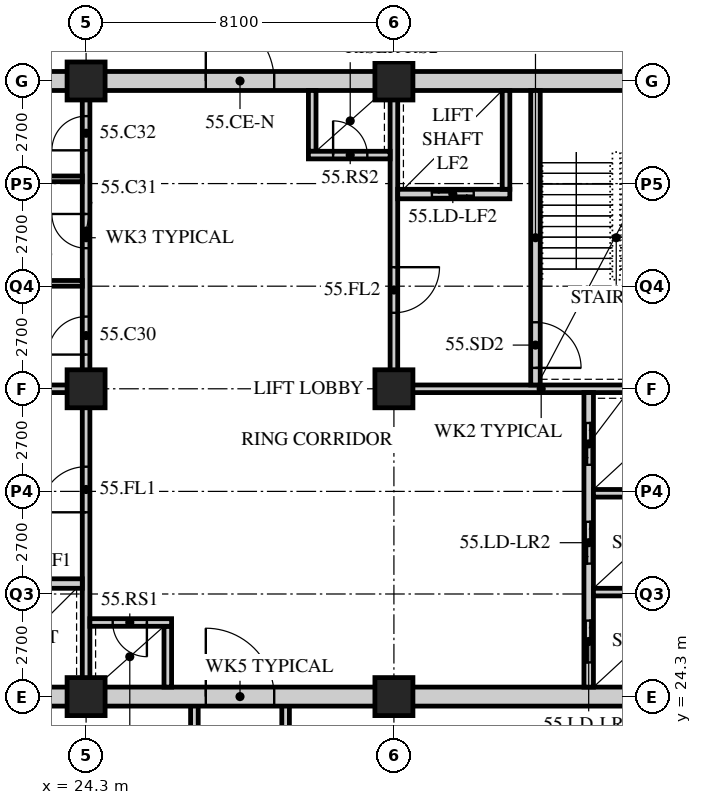
"""IFC4 building model, lengths in metres.
Left out: names, types, materials, properties, quantities, classifications, styles, units other than length and angle.
Written with IfcOpenShell. Run it as: python <this file> out.ifc"""

import sys

from ifc_helpers import new_model, si_unit, direction, frame, frame_2d, origin, origin_2d, place, context, subcontext, project, spatial, rectangle, hollow_rectangle, extrude, element, fill, save


model = new_model("IFC4")
c1 = context("Model", 3, precision=1e-05, world=origin(), true_north=direction((0.0, 1.0)))
c2 = subcontext(c1, "Body", "Model", "MODEL_VIEW")
j1 = project(units=[si_unit("LENGTHUNIT", "METRE"), si_unit("PLANEANGLEUNIT", "RADIAN")], contexts=[c1])
p1 = place(None, origin())
s1 = spatial("IfcSite", under=j1, at=p1, CompositionType="ELEMENT")
p2 = place(p1, origin())
s2 = spatial("IfcBuilding", under=s1, at=p2, CompositionType="ELEMENT")
p3 = place(p2, frame((0.0, 0.0, 213.6)))
s3 = spatial("IfcBuildingStorey", under=s2, at=p3, CompositionType="ELEMENT", Elevation=213.6)
for number, where, z_axis, x_axis in (
    (1, (24.3, 24.3, 0.0), (0.0, 0.0, 1.0), (1.0, 0.0, 0.0)),
    (2, (24.3, 32.4, 0.0), (0.0, 0.0, 1.0), (1.0, 0.0, 0.0)),
    (3, (24.3, 40.5, 0.0), (0.0, 0.0, 1.0), (1.0, 0.0, 0.0)),
    (4, (32.4, 24.3, 0.0), (0.0, 0.0, 1.0), (1.0, 0.0, 0.0)),
    (5, (32.4, 32.4, 0.0), (0.0, 0.0, 1.0), (1.0, 0.0, 0.0)),
    (6, (32.4, 40.5, 0.0), (0.0, 0.0, 1.0), (1.0, 0.0, 0.0)),
):
    element("IfcColumn", number, at=place(p3, frame(where, z_axis=z_axis, x_axis=x_axis)), inside=s3, PredefinedType="COLUMN", context=c2, shape_type="SweptSolid", body=[
        extrude(hollow_rectangle(XDim=1.0, YDim=1.0, WallThickness=0.1, at=origin_2d()), origin(), (0.0, 0.0, 1.0), 3.6),
    ])
for number, where, z_axis, x_axis in (
    (7, (27.15, 20.7, 0.0), (0.0, 0.0, 1.0), (0.0, 1.0, 0.0)),
    (8, (29.55, 20.7, 0.0), (0.0, 0.0, 1.0), (0.0, 1.0, 0.0)),
):
    element("IfcWall", number, at=place(p3, frame(where, z_axis=z_axis, x_axis=x_axis)), inside=s3, PredefinedType="SOLIDWALL", context=c2, shape_type="SweptSolid", body=[
        extrude(rectangle(XDim=3.6, YDim=0.2, at=frame_2d((1.8, 0.0))), origin(), (0.0, 0.0, 1.0), 3.39),
    ])
p4 = place(p3, frame((15.95, 24.3, 0.0), z_axis=(0.0, 0.0, 1.0), x_axis=(1.0, 0.0, 0.0)))
e9 = element("IfcWall", 9, at=p4, inside=s3, PredefinedType="SOLIDWALL", context=c2, shape_type="SweptSolid", body=[
    extrude(rectangle(XDim=24.8, YDim=0.5, at=frame_2d((12.4, 0.0))), origin(), (0.0, 0.0, 1.0), 2.74),
])
p5 = place(p4, frame((11.5, 0.0, 0.0)))
e10 = element("IfcOpeningElement", 10, at=p5, cuts=e9, PredefinedType="OPENING", context=c2, shape_type="SweptSolid", body=[
    extrude(rectangle(XDim=1.8, YDim=2.4, at=frame_2d((0.9, 1.2))), frame((0.0, 0.26, 0.0), z_axis=(0.0, -1.0, 0.0), x_axis=(1.0, 0.0, 0.0)), (0.0, 0.0, 1.0), 0.52),
])
p6 = place(p3, frame((15.95, 40.5, 0.0), z_axis=(0.0, 0.0, 1.0), x_axis=(1.0, 0.0, 0.0)))
e11 = element("IfcWall", 11, at=p6, inside=s3, PredefinedType="SOLIDWALL", context=c2, shape_type="SweptSolid", body=[
    extrude(rectangle(XDim=24.8, YDim=0.5, at=frame_2d((12.4, 0.0))), origin(), (0.0, 0.0, 1.0), 2.74),
])
p7 = place(p6, frame((11.5, 0.0, 0.0)))
e12 = element("IfcOpeningElement", 12, at=p7, cuts=e11, PredefinedType="OPENING", context=c2, shape_type="SweptSolid", body=[
    extrude(rectangle(XDim=1.8, YDim=2.4, at=frame_2d((0.9, 1.2))), frame((0.0, 0.26, 0.0), z_axis=(0.0, -1.0, 0.0), x_axis=(1.0, 0.0, 0.0)), (0.0, 0.0, 1.0), 0.52),
])
p8 = place(p3, frame((16.45, 32.4, 0.0), z_axis=(0.0, 0.0, 1.0), x_axis=(1.0, 0.0, 0.0)))
e13 = element("IfcWall", 13, at=p8, inside=s3, PredefinedType="SOLIDWALL", context=c2, shape_type="SweptSolid", body=[
    extrude(rectangle(XDim=7.95, YDim=0.2, at=frame_2d((3.975, 0.0))), origin(), (0.0, 0.0, 1.0), 2.778),
])
p9 = place(p3, frame((24.3, 24.55, 0.0), z_axis=(0.0, 0.0, 1.0), x_axis=(0.0, 1.0, 0.0)))
e14 = element("IfcWall", 14, at=p9, inside=s3, PredefinedType="SOLIDWALL", context=c2, shape_type="SweptSolid", body=[
    extrude(rectangle(XDim=7.75, YDim=0.2, at=frame_2d((3.875, 0.0))), origin(), (0.0, 0.0, 1.0), 2.778),
])
p10 = place(p9, frame((4.6, 0.0, 0.0)))
e15 = element("IfcOpeningElement", 15, at=p10, cuts=e14, PredefinedType="OPENING", context=c2, shape_type="SweptSolid", body=[
    extrude(rectangle(XDim=1.2, YDim=2.1, at=frame_2d((0.6, 1.05))), frame((0.0, 0.11, 0.0), z_axis=(0.0, -1.0, 0.0), x_axis=(1.0, 0.0, 0.0)), (0.0, 0.0, 1.0), 0.22),
])
p11 = place(p3, frame((21.25, 27.275, 0.0), z_axis=(0.0, 0.0, 1.0), x_axis=(1.0, 0.0, 0.0)))
e16 = element("IfcWall", 16, at=p11, inside=s3, PredefinedType="SOLIDWALL", context=c2, shape_type="SweptSolid", body=[
    extrude(rectangle(XDim=2.95, YDim=0.25, at=frame_2d((1.475, 0.0))), origin(), (0.0, 0.0, 1.0), 3.39),
])
p12 = place(p11, frame((0.95, 0.0, 0.0)))
e17 = element("IfcOpeningElement", 17, at=p12, cuts=e16, PredefinedType="OPENING", context=c2, shape_type="SweptSolid", body=[
    extrude(rectangle(XDim=1.1, YDim=2.4, at=frame_2d((0.55, 1.2))), frame((0.0, 0.135, 0.0), z_axis=(0.0, -1.0, 0.0), x_axis=(1.0, 0.0, 0.0)), (0.0, 0.0, 1.0), 0.27),
])
p13 = place(p3, frame((26.45, 24.55, 0.0), z_axis=(0.0, 0.0, 1.0), x_axis=(0.0, 1.0, 0.0)))
e18 = element("IfcWall", 18, at=p13, inside=s3, PredefinedType="SOLIDWALL", context=c2, shape_type="SweptSolid", body=[
    extrude(rectangle(XDim=1.6, YDim=0.2, at=frame_2d((0.8, 0.0))), origin(), (0.0, 0.0, 1.0), 3.39),
])
p14 = place(p3, frame((24.4, 26.25, 0.0), z_axis=(0.0, 0.0, 1.0), x_axis=(1.0, 0.0, 0.0)))
e19 = element("IfcWall", 19, at=p14, inside=s3, PredefinedType="SOLIDWALL", context=c2, shape_type="SweptSolid", body=[
    extrude(rectangle(XDim=2.15, YDim=0.2, at=frame_2d((1.075, 0.0))), origin(), (0.0, 0.0, 1.0), 3.39),
])
p15 = place(p14, frame((0.6, 0.0, 0.0)))
e20 = element("IfcOpeningElement", 20, at=p15, cuts=e19, PredefinedType="OPENING", context=c2, shape_type="SweptSolid", body=[
    extrude(rectangle(XDim=0.9, YDim=2.1, at=frame_2d((0.45, 1.05))), frame((0.0, 0.11, 0.0), z_axis=(0.0, -1.0, 0.0), x_axis=(1.0, 0.0, 0.0)), (0.0, 0.0, 1.0), 0.22),
])
p16 = place(p3, frame((32.3, 32.4, 0.0), z_axis=(0.0, 0.0, 1.0), x_axis=(1.0, 0.0, 0.0)))
e21 = element("IfcWall", 21, at=p16, inside=s3, PredefinedType="SOLIDWALL", context=c2, shape_type="SweptSolid", body=[
    extrude(rectangle(XDim=7.95, YDim=0.2, at=frame_2d((3.975, 0.0))), origin(), (0.0, 0.0, 1.0), 2.778),
])
p17 = place(p3, frame((32.4, 32.5, 0.0), z_axis=(0.0, 0.0, 1.0), x_axis=(0.0, 1.0, 0.0)))
e22 = element("IfcWall", 22, at=p17, inside=s3, PredefinedType="SOLIDWALL", context=c2, shape_type="SweptSolid", body=[
    extrude(rectangle(XDim=7.75, YDim=0.2, at=frame_2d((3.875, 0.0))), origin(), (0.0, 0.0, 1.0), 2.778),
])
p18 = place(p17, frame((1.9, 0.0, 0.0)))
e23 = element("IfcOpeningElement", 23, at=p18, cuts=e22, PredefinedType="OPENING", context=c2, shape_type="SweptSolid", body=[
    extrude(rectangle(XDim=1.2, YDim=2.1, at=frame_2d((0.6, 1.05))), frame((0.0, 0.11, 0.0), z_axis=(0.0, -1.0, 0.0), x_axis=(1.0, 0.0, 0.0)), (0.0, 0.0, 1.0), 0.22),
])
p19 = place(p3, frame((37.525, 24.55, 0.0), z_axis=(0.0, 0.0, 1.0), x_axis=(0.0, 1.0, 0.0)))
e24 = element("IfcWall", 24, at=p19, inside=s3, PredefinedType="SOLIDWALL", context=c2, shape_type="SweptSolid", body=[
    extrude(rectangle(XDim=7.75, YDim=0.25, at=frame_2d((3.875, 0.0))), origin(), (0.0, 0.0, 1.0), 3.39),
])
p20 = place(p19, frame((0.65, 0.0, 0.0)))
e25 = element("IfcOpeningElement", 25, at=p20, cuts=e24, PredefinedType="OPENING", context=c2, shape_type="SweptSolid", body=[
    extrude(rectangle(XDim=1.1, YDim=2.4, at=frame_2d((0.55, 1.2))), frame((0.0, 0.135, 0.0), z_axis=(0.0, -1.0, 0.0), x_axis=(1.0, 0.0, 0.0)), (0.0, 0.0, 1.0), 0.27),
])
p21 = place(p19, frame((3.25, 0.0, 0.0)))
e26 = element("IfcOpeningElement", 26, at=p21, cuts=e24, PredefinedType="OPENING", context=c2, shape_type="SweptSolid", body=[
    extrude(rectangle(XDim=1.1, YDim=2.4, at=frame_2d((0.55, 1.2))), frame((0.0, 0.135, 0.0), z_axis=(0.0, -1.0, 0.0), x_axis=(1.0, 0.0, 0.0)), (0.0, 0.0, 1.0), 0.27),
])
p22 = place(p19, frame((5.85, 0.0, 0.0)))
e27 = element("IfcOpeningElement", 27, at=p22, cuts=e24, PredefinedType="OPENING", context=c2, shape_type="SweptSolid", body=[
    extrude(rectangle(XDim=1.1, YDim=2.4, at=frame_2d((0.55, 1.2))), frame((0.0, 0.135, 0.0), z_axis=(0.0, -1.0, 0.0), x_axis=(1.0, 0.0, 0.0)), (0.0, 0.0, 1.0), 0.27),
])
for number, where, z_axis, x_axis in (
    (28, (37.65, 27.05, 0.0), (0.0, 0.0, 1.0), (1.0, 0.0, 0.0)),
    (29, (37.65, 29.65, 0.0), (0.0, 0.0, 1.0), (1.0, 0.0, 0.0)),
):
    element("IfcWall", number, at=place(p3, frame(where, z_axis=z_axis, x_axis=x_axis)), inside=s3, PredefinedType="SOLIDWALL", context=c2, shape_type="SweptSolid", body=[
        extrude(rectangle(XDim=2.6, YDim=0.2, at=frame_2d((1.3, 0.0))), origin(), (0.0, 0.0, 1.0), 3.39),
    ])
p23 = place(p3, frame((36.125, 32.5, 0.0), z_axis=(0.0, 0.0, 1.0), x_axis=(0.0, 1.0, 0.0)))
e30 = element("IfcWall", 30, at=p23, inside=s3, PredefinedType="SOLIDWALL", context=c2, shape_type="SweptSolid", body=[
    extrude(rectangle(XDim=7.75, YDim=0.25, at=frame_2d((3.875, 0.0))), origin(), (0.0, 0.0, 1.0), 3.39),
])
p24 = place(p23, frame((0.45, 0.0, 0.0)))
e31 = element("IfcOpeningElement", 31, at=p24, cuts=e30, PredefinedType="OPENING", context=c2, shape_type="SweptSolid", body=[
    extrude(rectangle(XDim=1.2, YDim=2.1, at=frame_2d((0.6, 1.05))), frame((0.0, 0.135, 0.0), z_axis=(0.0, -1.0, 0.0), x_axis=(1.0, 0.0, 0.0)), (0.0, 0.0, 1.0), 0.27),
])
p25 = place(p3, frame((32.5, 37.525, 0.0), z_axis=(0.0, 0.0, 1.0), x_axis=(1.0, 0.0, 0.0)))
e32 = element("IfcWall", 32, at=p25, inside=s3, PredefinedType="SOLIDWALL", context=c2, shape_type="SweptSolid", body=[
    extrude(rectangle(XDim=2.95, YDim=0.25, at=frame_2d((1.475, 0.0))), origin(), (0.0, 0.0, 1.0), 3.39),
])
p26 = place(p25, frame((0.9, 0.0, 0.0)))
e33 = element("IfcOpeningElement", 33, at=p26, cuts=e32, PredefinedType="OPENING", context=c2, shape_type="SweptSolid", body=[
    extrude(rectangle(XDim=1.1, YDim=2.4, at=frame_2d((0.55, 1.2))), frame((0.0, 0.135, 0.0), z_axis=(0.0, -1.0, 0.0), x_axis=(1.0, 0.0, 0.0)), (0.0, 0.0, 1.0), 0.27),
])
p27 = place(p3, frame((35.35, 37.65, 0.0), z_axis=(0.0, 0.0, 1.0), x_axis=(0.0, 1.0, 0.0)))
e34 = element("IfcWall", 34, at=p27, inside=s3, PredefinedType="SOLIDWALL", context=c2, shape_type="SweptSolid", body=[
    extrude(rectangle(XDim=2.6, YDim=0.2, at=frame_2d((1.3, 0.0))), origin(), (0.0, 0.0, 1.0), 3.39),
])
p28 = place(p3, frame((30.25, 38.65, 0.0), z_axis=(0.0, 0.0, 1.0), x_axis=(0.0, 1.0, 0.0)))
e35 = element("IfcWall", 35, at=p28, inside=s3, PredefinedType="SOLIDWALL", context=c2, shape_type="SweptSolid", body=[
    extrude(rectangle(XDim=1.6, YDim=0.2, at=frame_2d((0.8, 0.0))), origin(), (0.0, 0.0, 1.0), 3.39),
])
p29 = place(p3, frame((30.15, 38.55, 0.0), z_axis=(0.0, 0.0, 1.0), x_axis=(1.0, 0.0, 0.0)))
e36 = element("IfcWall", 36, at=p29, inside=s3, PredefinedType="SOLIDWALL", context=c2, shape_type="SweptSolid", body=[
    extrude(rectangle(XDim=2.15, YDim=0.2, at=frame_2d((1.075, 0.0))), origin(), (0.0, 0.0, 1.0), 3.39),
])
p30 = place(p29, frame((0.65, 0.0, 0.0)))
e37 = element("IfcOpeningElement", 37, at=p30, cuts=e36, PredefinedType="OPENING", context=c2, shape_type="SweptSolid", body=[
    extrude(rectangle(XDim=0.9, YDim=2.1, at=frame_2d((0.45, 1.05))), frame((0.0, 0.11, 0.0), z_axis=(0.0, -1.0, 0.0), x_axis=(1.0, 0.0, 0.0)), (0.0, 0.0, 1.0), 0.22),
])
p31 = place(p3, frame((24.3, 32.5, 0.0), z_axis=(0.0, 0.0, 1.0), x_axis=(0.0, 1.0, 0.0)))
e38 = element("IfcWall", 38, at=p31, inside=s3, PredefinedType="PARTITIONING", context=c2, shape_type="SweptSolid", body=[
    extrude(rectangle(XDim=7.75, YDim=0.2, at=frame_2d((3.875, 0.0))), origin(), (0.0, 0.0, 1.0), 2.778),
])
p32 = place(p31, frame((0.8, 0.0, 0.0)))
e39 = element("IfcOpeningElement", 39, at=p32, cuts=e38, PredefinedType="OPENING", context=c2, shape_type="SweptSolid", body=[
    extrude(rectangle(XDim=1.0, YDim=2.1, at=frame_2d((0.5, 1.05))), frame((0.0, 0.11, 0.0), z_axis=(0.0, -1.0, 0.0), x_axis=(1.0, 0.0, 0.0)), (0.0, 0.0, 1.0), 0.22),
])
p33 = place(p31, frame((3.6, 0.0, 0.0)))
e40 = element("IfcOpeningElement", 40, at=p33, cuts=e38, PredefinedType="OPENING", context=c2, shape_type="SweptSolid", body=[
    extrude(rectangle(XDim=0.9, YDim=2.1, at=frame_2d((0.45, 1.05))), frame((0.0, 0.11, 0.0), z_axis=(0.0, -1.0, 0.0), x_axis=(1.0, 0.0, 0.0)), (0.0, 0.0, 1.0), 0.22),
])
p34 = place(p31, frame((6.175, 0.0, 0.0)))
e41 = element("IfcOpeningElement", 41, at=p34, cuts=e38, PredefinedType="OPENING", context=c2, shape_type="SweptSolid", body=[
    extrude(rectangle(XDim=0.9, YDim=2.1, at=frame_2d((0.45, 1.05))), frame((0.0, 0.11, 0.0), z_axis=(0.0, -1.0, 0.0), x_axis=(1.0, 0.0, 0.0)), (0.0, 0.0, 1.0), 0.22),
])
for number, where, z_axis, x_axis in (
    (42, (21.65, 35.175, 0.0), (0.0, 0.0, 1.0), (1.0, 0.0, 0.0)),
    (43, (21.65, 37.925, 0.0), (0.0, 0.0, 1.0), (1.0, 0.0, 0.0)),
):
    element("IfcWall", number, at=place(p3, frame(where, z_axis=z_axis, x_axis=x_axis)), inside=s3, PredefinedType="PARTITIONING", context=c2, shape_type="SweptSolid", body=[
        extrude(rectangle(XDim=2.55, YDim=0.15, at=frame_2d((1.275, 0.0))), origin(), (0.0, 0.0, 1.0), 3.39),
    ])
p35 = place(p32, origin())
e44 = element("IfcDoor", 44, at=p35, inside=s3, OperationType="SINGLE_SWING_LEFT", PredefinedType="DOOR", context=c2, shape_type="SweptSolid", body=[
    extrude(rectangle(XDim=1.0, YDim=2.1, at=frame_2d((0.5, 1.05))), frame((0.0, 0.025, 0.0), z_axis=(0.0, -1.0, 0.0), x_axis=(1.0, 0.0, 0.0)), (0.0, 0.0, 1.0), 0.05),
])
fill(e39, e44)
p36 = place(p33, origin())
e45 = element("IfcDoor", 45, at=p36, inside=s3, OperationType="SINGLE_SWING_RIGHT", PredefinedType="DOOR", context=c2, shape_type="SweptSolid", body=[
    extrude(rectangle(XDim=0.9, YDim=2.1, at=frame_2d((0.45, 1.05))), frame((0.0, 0.025, 0.0), z_axis=(0.0, -1.0, 0.0), x_axis=(1.0, 0.0, 0.0)), (0.0, 0.0, 1.0), 0.05),
])
fill(e40, e45)
p37 = place(p34, origin())
e46 = element("IfcDoor", 46, at=p37, inside=s3, OperationType="SINGLE_SWING_LEFT", PredefinedType="DOOR", context=c2, shape_type="SweptSolid", body=[
    extrude(rectangle(XDim=0.9, YDim=2.1, at=frame_2d((0.45, 1.05))), frame((0.0, 0.025, 0.0), z_axis=(0.0, -1.0, 0.0), x_axis=(1.0, 0.0, 0.0)), (0.0, 0.0, 1.0), 0.05),
])
fill(e41, e46)
p38 = place(p10, origin())
e47 = element("IfcDoor", 47, at=p38, inside=s3, OperationType="SINGLE_SWING_LEFT", PredefinedType="DOOR", context=c2, shape_type="SweptSolid", body=[
    extrude(rectangle(XDim=1.2, YDim=2.1, at=frame_2d((0.6, 1.05))), frame((0.0, 0.025, 0.0), z_axis=(0.0, -1.0, 0.0), x_axis=(1.0, 0.0, 0.0)), (0.0, 0.0, 1.0), 0.05),
])
fill(e15, e47)
p39 = place(p15, origin())
e48 = element("IfcDoor", 48, at=p39, inside=s3, OperationType="SINGLE_SWING_LEFT", PredefinedType="DOOR", context=c2, shape_type="SweptSolid", body=[
    extrude(rectangle(XDim=0.9, YDim=2.1, at=frame_2d((0.45, 1.05))), frame((0.0, 0.025, 0.0), z_axis=(0.0, -1.0, 0.0), x_axis=(1.0, 0.0, 0.0)), (0.0, 0.0, 1.0), 0.05),
])
fill(e20, e48)
p40 = place(p24, origin())
e49 = element("IfcDoor", 49, at=p40, inside=s3, OperationType="SINGLE_SWING_RIGHT", PredefinedType="DOOR", context=c2, shape_type="SweptSolid", body=[
    extrude(rectangle(XDim=1.2, YDim=2.1, at=frame_2d((0.6, 1.05))), frame((0.0, 0.025, 0.0), z_axis=(0.0, -1.0, 0.0), x_axis=(1.0, 0.0, 0.0)), (0.0, 0.0, 1.0), 0.05),
])
fill(e31, e49)
p41 = place(p18, origin())
e50 = element("IfcDoor", 50, at=p41, inside=s3, OperationType="SINGLE_SWING_LEFT", PredefinedType="DOOR", context=c2, shape_type="SweptSolid", body=[
    extrude(rectangle(XDim=1.2, YDim=2.1, at=frame_2d((0.6, 1.05))), frame((0.0, 0.025, 0.0), z_axis=(0.0, -1.0, 0.0), x_axis=(1.0, 0.0, 0.0)), (0.0, 0.0, 1.0), 0.05),
])
fill(e23, e50)
p42 = place(p30, origin())
e51 = element("IfcDoor", 51, at=p42, inside=s3, OperationType="SINGLE_SWING_LEFT", PredefinedType="DOOR", context=c2, shape_type="SweptSolid", body=[
    extrude(rectangle(XDim=0.9, YDim=2.1, at=frame_2d((0.45, 1.05))), frame((0.0, 0.025, 0.0), z_axis=(0.0, -1.0, 0.0), x_axis=(1.0, 0.0, 0.0)), (0.0, 0.0, 1.0), 0.05),
])
fill(e37, e51)
p43 = place(p20, origin())
e52 = element("IfcDoor", 52, at=p43, inside=s3, OperationType="DOUBLE_DOOR_SLIDING", PredefinedType="DOOR", context=c2, shape_type="SweptSolid", body=[
    extrude(rectangle(XDim=1.1, YDim=2.4, at=frame_2d((0.55, 1.2))), frame((0.0, 0.025, 0.0), z_axis=(0.0, -1.0, 0.0), x_axis=(1.0, 0.0, 0.0)), (0.0, 0.0, 1.0), 0.05),
])
fill(e25, e52)
p44 = place(p21, origin())
e53 = element("IfcDoor", 53, at=p44, inside=s3, OperationType="DOUBLE_DOOR_SLIDING", PredefinedType="DOOR", context=c2, shape_type="SweptSolid", body=[
    extrude(rectangle(XDim=1.1, YDim=2.4, at=frame_2d((0.55, 1.2))), frame((0.0, 0.025, 0.0), z_axis=(0.0, -1.0, 0.0), x_axis=(1.0, 0.0, 0.0)), (0.0, 0.0, 1.0), 0.05),
])
fill(e26, e53)
p45 = place(p22, origin())
e54 = element("IfcDoor", 54, at=p45, inside=s3, OperationType="DOUBLE_DOOR_SLIDING", PredefinedType="DOOR", context=c2, shape_type="SweptSolid", body=[
    extrude(rectangle(XDim=1.1, YDim=2.4, at=frame_2d((0.55, 1.2))), frame((0.0, 0.025, 0.0), z_axis=(0.0, -1.0, 0.0), x_axis=(1.0, 0.0, 0.0)), (0.0, 0.0, 1.0), 0.05),
])
fill(e27, e54)
p46 = place(p26, origin())
e55 = element("IfcDoor", 55, at=p46, inside=s3, OperationType="DOUBLE_DOOR_SLIDING", PredefinedType="DOOR", context=c2, shape_type="SweptSolid", body=[
    extrude(rectangle(XDim=1.1, YDim=2.4, at=frame_2d((0.55, 1.2))), frame((0.0, 0.025, 0.0), z_axis=(0.0, -1.0, 0.0), x_axis=(1.0, 0.0, 0.0)), (0.0, 0.0, 1.0), 0.05),
])
fill(e33, e55)
p47 = place(p5, origin())
e56 = element("IfcDoor", 56, at=p47, inside=s3, OperationType="DOUBLE_DOOR_SINGLE_SWING", PredefinedType="DOOR", context=c2, shape_type="SweptSolid", body=[
    extrude(rectangle(XDim=1.8, YDim=2.4, at=frame_2d((0.9, 1.2))), frame((0.0, 0.025, 0.0), z_axis=(0.0, -1.0, 0.0), x_axis=(1.0, 0.0, 0.0)), (0.0, 0.0, 1.0), 0.05),
])
fill(e10, e56)
p48 = place(p7, origin())
e57 = element("IfcDoor", 57, at=p48, inside=s3, OperationType="DOUBLE_DOOR_SINGLE_SWING", PredefinedType="DOOR", context=c2, shape_type="SweptSolid", body=[
    extrude(rectangle(XDim=1.8, YDim=2.4, at=frame_2d((0.9, 1.2))), frame((0.0, 0.025, 0.0), z_axis=(0.0, -1.0, 0.0), x_axis=(1.0, 0.0, 0.0)), (0.0, 0.0, 1.0), 0.05),
])
fill(e12, e57)
save(model, sys.argv[1])
